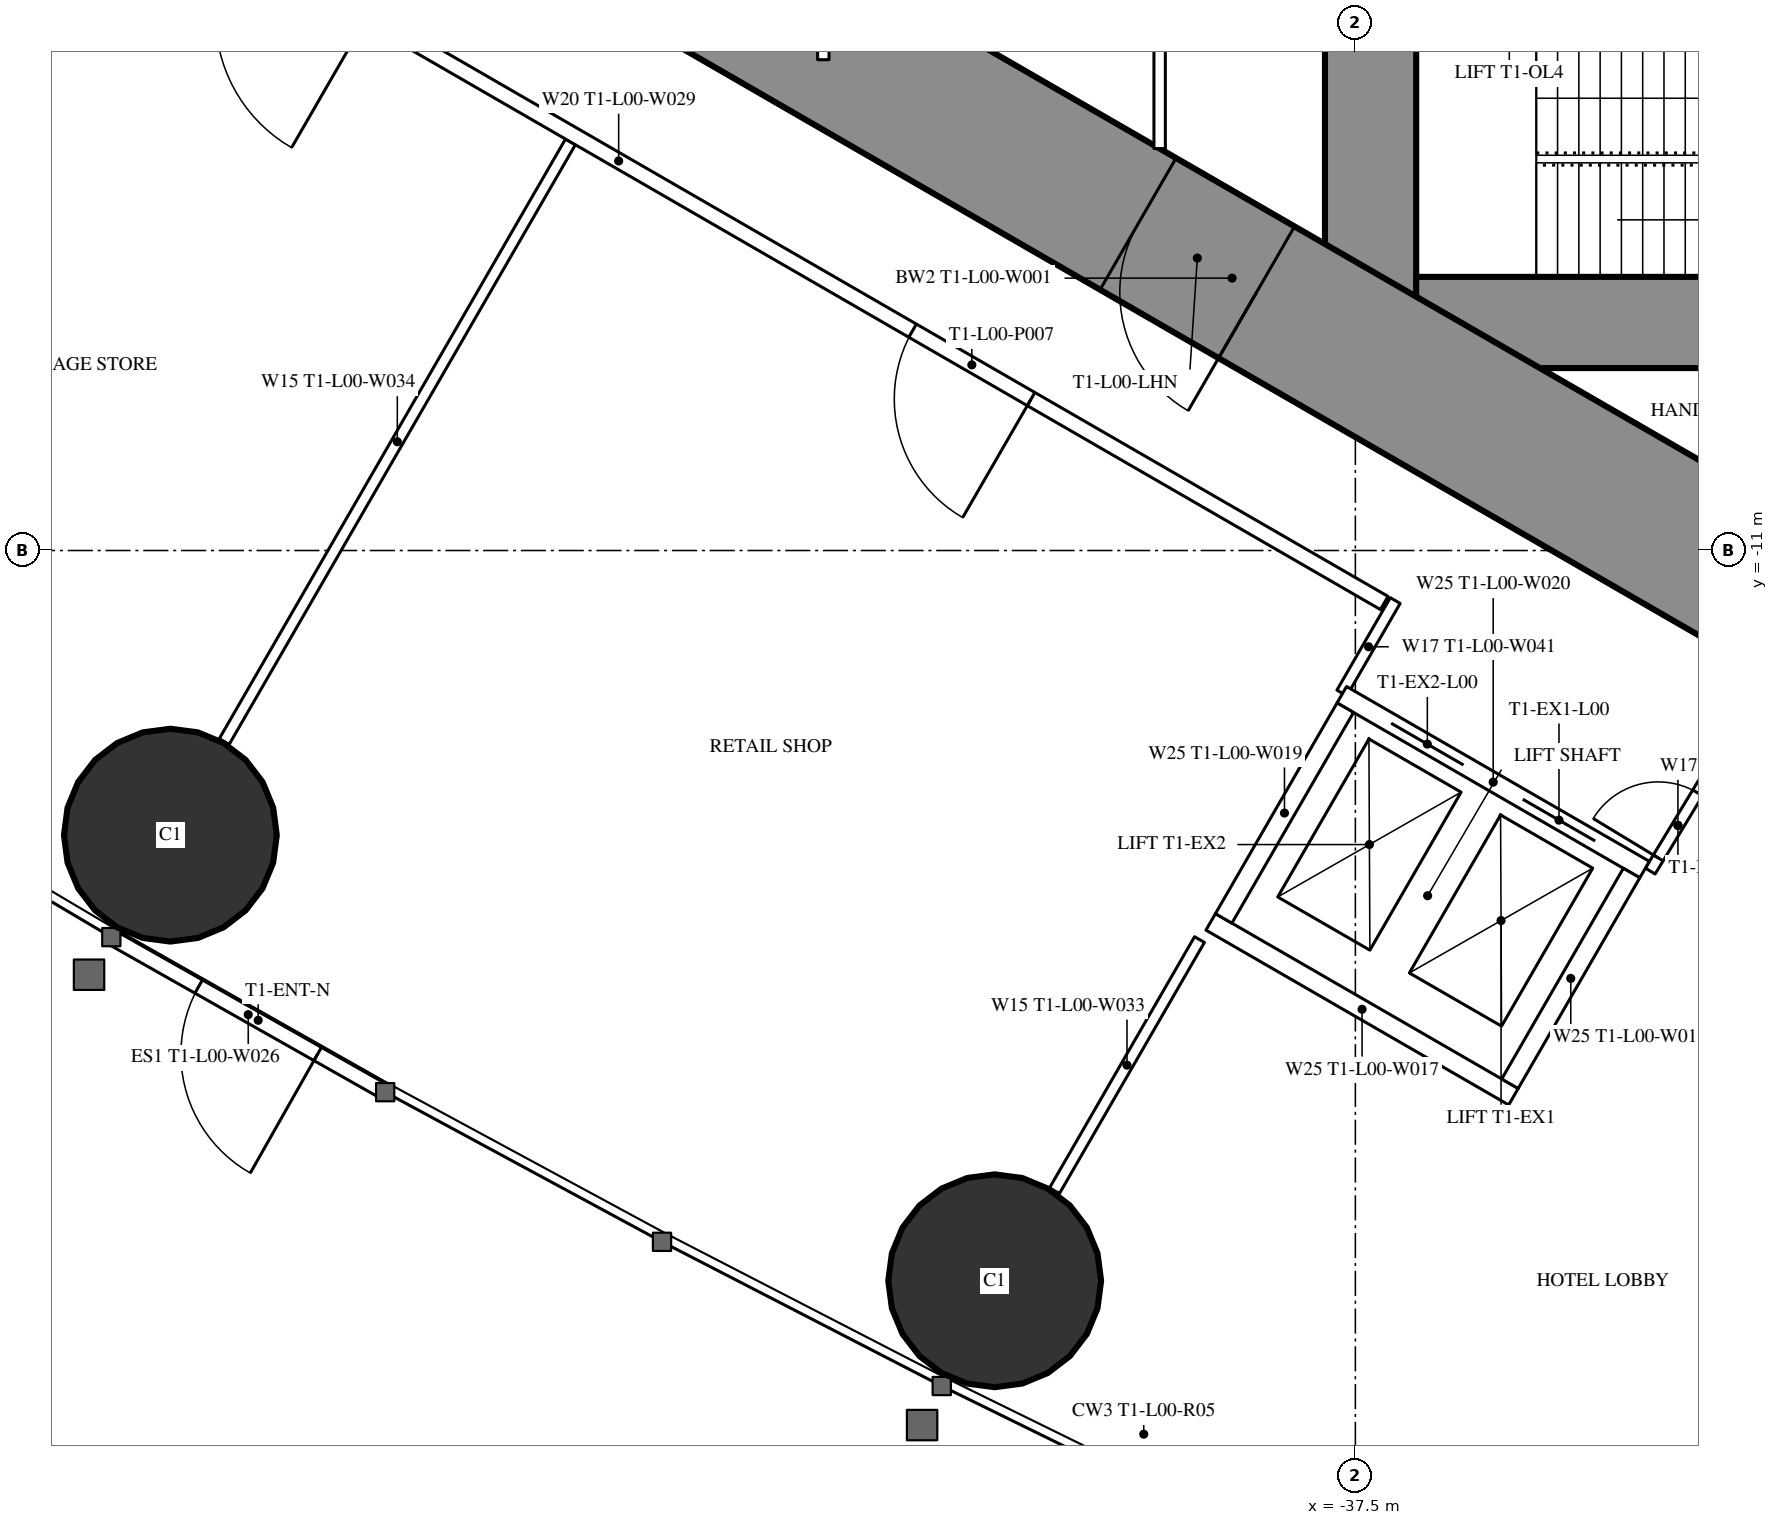
"""IFC4 building model, lengths in metres.
Left out: names, types, materials, properties, quantities, classifications, styles, units other than length and angle.
Written with IfcOpenShell. Run it as: python <this file> out.ifc"""

import sys

from ifc_helpers import new_model, si_unit, direction, frame, frame_2d, origin, origin_2d, place, context, subcontext, project, spatial, rectangle, hollow_circle, extrude, element, fill, save


model = new_model("IFC4")
c1 = context("Model", 3, precision=1e-05, world=origin(), true_north=direction((0.0, 1.0)))
c2 = subcontext(c1, "Body", "Model", "MODEL_VIEW")
j1 = project(units=[si_unit("LENGTHUNIT", "METRE"), si_unit("PLANEANGLEUNIT", "RADIAN")], contexts=[c1])
p1 = place(None, origin())
s1 = spatial("IfcSite", under=j1, at=p1, CompositionType="ELEMENT")
p2 = place(p1, origin())
s2 = spatial("IfcBuilding", under=s1, at=p2, CompositionType="ELEMENT")
p3 = place(p2, origin())
s3 = spatial("IfcBuildingStorey", under=s2, at=p3, CompositionType="ELEMENT", Elevation=0.0)
for number, where, z_axis, x_axis in (
    (1, (-53.09, -14.745, 0.0), (0.0, 0.0, 1.0), (1.0, 0.0, 0.0)),
    (2, (-42.245, -20.607, 0.0), (0.0, 0.0, 1.0), (1.0, 0.0, 0.0)),
):
    element("IfcColumn", number, at=place(p3, frame(where, z_axis=z_axis, x_axis=x_axis)), inside=s3, PredefinedType="COLUMN", context=c2, shape_type="SweptSolid", body=[
        extrude(hollow_circle(Radius=1.4, WallThickness=0.12, at=origin_2d()), origin(), (0.0, 0.0, 1.0), 7.2),
    ])
p4 = place(p3, frame((-37.3, 8.6, 0.0), z_axis=(0.0, 0.0, 1.0), x_axis=(0.0, -1.0, 0.0)))
e3 = element("IfcWall", 3, at=p4, inside=s3, PredefinedType="SHEAR", context=c2, shape_type="SweptSolid", body=[
    extrude(rectangle(XDim=17.2, YDim=1.2, at=frame_2d((8.6, 0.0))), origin(), (0.0, 0.0, 1.0), 7.2),
])
p5 = place(p4, frame((7.7, 0.0, 0.0)))
e4 = element("IfcOpeningElement", 4, at=p5, cuts=e3, PredefinedType="OPENING", context=c2, shape_type="SweptSolid", body=[
    extrude(rectangle(XDim=1.8, YDim=2.2, at=frame_2d((0.9, 1.1))), frame((0.0, 0.61, 0.0), z_axis=(0.0, -1.0, 0.0), x_axis=(1.0, 0.0, 0.0)), (0.0, 0.0, 1.0), 1.22),
])
p6 = place(p3, frame((-28.3, -8.0, 0.0), z_axis=(0.0, 0.0, 1.0), x_axis=(-1.0, 0.0, 0.0)))
e5 = element("IfcWall", 5, at=p6, inside=s3, PredefinedType="SHEAR", context=c2, shape_type="SweptSolid", body=[
    extrude(rectangle(XDim=8.4, YDim=1.2, at=frame_2d((4.2, 0.0))), origin(), (0.0, 0.0, 1.0), 7.2),
])
p7 = place(p6, frame((0.25, 0.0, 0.0)))
e6 = element("IfcOpeningElement", 6, at=p7, cuts=e5, PredefinedType="OPENING", context=c2, shape_type="SweptSolid", body=[
    extrude(rectangle(XDim=1.0, YDim=2.2, at=frame_2d((0.5, 1.1))), frame((0.0, 0.61, 0.0), z_axis=(0.0, -1.0, 0.0), x_axis=(1.0, 0.0, 0.0)), (0.0, 0.0, 1.0), 1.22),
])
p8 = place(p3, frame((-27.2, -14.3, 0.0), z_axis=(0.0, 0.0, 1.0), x_axis=(-0.866024044937, 0.500002353585, 0.0)))
e7 = element("IfcWall", 7, at=p8, inside=s3, PredefinedType="SHEAR", context=c2, shape_type="SweptSolid", body=[
    extrude(rectangle(XDim=27.533, YDim=2.0, at=frame_2d((13.767, 0.0))), origin(), (0.0, 0.0, 1.0), 7.2),
])
p9 = place(p8, frame((4.6, 0.0, 0.0)))
e8 = element("IfcOpeningElement", 8, at=p9, cuts=e7, PredefinedType="OPENING", context=c2, shape_type="SweptSolid", body=[
    extrude(rectangle(XDim=1.0, YDim=2.2, at=frame_2d((0.5, 1.1))), frame((0.0, 1.01, 0.0), z_axis=(0.0, -1.0, 0.0), x_axis=(1.0, 0.0, 0.0)), (0.0, 0.0, 1.0), 2.02),
])
p10 = place(p8, frame((13.395, 0.0, 0.0)))
e9 = element("IfcOpeningElement", 9, at=p10, cuts=e7, PredefinedType="OPENING", context=c2, shape_type="SweptSolid", body=[
    extrude(rectangle(XDim=1.8, YDim=2.2, at=frame_2d((0.9, 1.1))), frame((0.0, 1.01, 0.0), z_axis=(0.0, -1.0, 0.0), x_axis=(1.0, 0.0, 0.0)), (0.0, 0.0, 1.0), 2.02),
])
p11 = place(p3, frame((-50.264, -18.126, 0.0), z_axis=(0.0, 0.0, 1.0), x_axis=(-0.870206768985, 0.49268669478, 0.0)))
e10 = element("IfcWall", 10, at=p11, inside=s3, PredefinedType="STANDARD", context=c2, shape_type="SweptSolid", body=[
    extrude(rectangle(XDim=4.14, YDim=0.2, at=frame_2d((2.07, 0.0))), origin(), (0.0, 0.0, 1.0), 6.85),
])
p12 = place(p11, frame((1.02, 0.0, 0.0)))
e11 = element("IfcOpeningElement", 11, at=p12, cuts=e10, PredefinedType="OPENING", context=c2, shape_type="SweptSolid", body=[
    extrude(rectangle(XDim=1.8, YDim=2.4, at=frame_2d((0.9, 1.2))), frame((0.0, 0.11, 0.0), z_axis=(0.0, -1.0, 0.0), x_axis=(1.0, 0.0, 0.0)), (0.0, 0.0, 1.0), 0.22),
])
p13 = place(p3, frame((-47.827, -5.624, 0.0), z_axis=(0.0, 0.0, 1.0), x_axis=(-0.499995404498, -0.866028056982, 0.0)))
e12 = element("IfcWall", 12, at=p13, inside=s3, PredefinedType="PARTITIONING", context=c2, shape_type="SweptSolid", body=[
    extrude(rectangle(XDim=9.11, YDim=0.15, at=frame_2d((4.555, 0.0))), origin(), (0.0, 0.0, 1.0), 5.85),
])
p14 = place(p3, frame((-39.551, -16.118, 0.0), z_axis=(0.0, 0.0, 1.0), x_axis=(-0.499986503906, -0.866033195618, 0.0)))
e13 = element("IfcWall", 13, at=p14, inside=s3, PredefinedType="PARTITIONING", context=c2, shape_type="SweptSolid", body=[
    extrude(rectangle(XDim=3.815, YDim=0.15, at=frame_2d((1.907, 0.0))), origin(), (0.0, 0.0, 1.0), 6.85),
])
p15 = place(p3, frame((-27.5, -17.244, 0.0), z_axis=(0.0, 0.0, 1.0), x_axis=(-0.866027347857, 0.499996632752, 0.0)))
e14 = element("IfcWall", 14, at=p15, inside=s3, PredefinedType="PARTITIONING", context=c2, shape_type="SweptSolid", body=[
    extrude(rectangle(XDim=6.269, YDim=0.2, at=frame_2d((3.135, 0.0))), origin(), (0.0, 0.0, 1.0), 6.85),
])
p16 = place(p3, frame((-37.12, -11.69, 0.0), z_axis=(0.0, 0.0, 1.0), x_axis=(-0.866028803602, 0.499994111297, 0.0)))
e15 = element("IfcWall", 15, at=p16, inside=s3, PredefinedType="PARTITIONING", context=c2, shape_type="SweptSolid", body=[
    extrude(rectangle(XDim=23.26, YDim=0.2, at=frame_2d((11.63, 0.0))), origin(), (0.0, 0.0, 1.0), 6.85),
])
p17 = place(p16, frame((20.909, 0.0, 0.0)))
e16 = element("IfcOpeningElement", 16, at=p17, cuts=e15, PredefinedType="OPENING", context=c2, shape_type="SweptSolid", body=[
    extrude(rectangle(XDim=1.8, YDim=2.2, at=frame_2d((0.9, 1.1))), frame((0.0, 0.11, 0.0), z_axis=(0.0, -1.0, 0.0), x_axis=(1.0, 0.0, 0.0)), (0.0, 0.0, 1.0), 0.22),
])
p18 = place(p16, frame((15.444, 0.0, 0.0)))
e17 = element("IfcOpeningElement", 17, at=p18, cuts=e15, PredefinedType="OPENING", context=c2, shape_type="SweptSolid", body=[
    extrude(rectangle(XDim=2.0, YDim=2.4, at=frame_2d((1.0, 1.2))), frame((0.0, 0.11, 0.0), z_axis=(0.0, -1.0, 0.0), x_axis=(1.0, 0.0, 0.0)), (0.0, 0.0, 1.0), 0.22),
])
p19 = place(p16, frame((5.365, 0.0, 0.0)))
e18 = element("IfcOpeningElement", 18, at=p19, cuts=e15, PredefinedType="OPENING", context=c2, shape_type="SweptSolid", body=[
    extrude(rectangle(XDim=1.8, YDim=2.2, at=frame_2d((0.9, 1.1))), frame((0.0, 0.11, 0.0), z_axis=(0.0, -1.0, 0.0), x_axis=(1.0, 0.0, 0.0)), (0.0, 0.0, 1.0), 0.22),
])
p20 = place(p3, frame((-36.976, -11.658, 0.0), z_axis=(0.0, 0.0, 1.0), x_axis=(-0.50008355685, -0.86597715684, 0.0)))
e19 = element("IfcWall", 19, at=p20, inside=s3, PredefinedType="PARTITIONING", context=c2, shape_type="SweptSolid", body=[
    extrude(rectangle(XDim=1.405, YDim=0.15, at=frame_2d((0.702, 0.0))), origin(), (0.0, 0.0, 1.0), 6.85),
])
p21 = place(p3, frame((-33.621, -15.218, 0.0), z_axis=(0.0, 0.0, 1.0), x_axis=(0.518424923641, 0.855123148177, 0.0)))
e20 = element("IfcWall", 20, at=p21, inside=s3, PredefinedType="PARTITIONING", context=c2, shape_type="SweptSolid", body=[
    extrude(rectangle(XDim=1.405, YDim=0.15, at=frame_2d((0.703, 0.0))), origin(), (0.0, 0.0, 1.0), 6.85),
])
p22 = place(p21, frame((0.203, 0.0, 0.0)))
e21 = element("IfcOpeningElement", 21, at=p22, cuts=e20, PredefinedType="OPENING", context=c2, shape_type="SweptSolid", body=[
    extrude(rectangle(XDim=1.0, YDim=2.2, at=frame_2d((0.5, 1.1))), frame((0.0, 0.085, 0.0), z_axis=(0.0, -1.0, 0.0), x_axis=(1.0, 0.0, 0.0)), (0.0, 0.0, 1.0), 0.17),
])
p23 = place(p3, frame((-40.075, 5.712, 0.0), z_axis=(0.0, 0.0, 1.0), x_axis=(0.0, -1.0, 0.0)))
e22 = element("IfcWall", 22, at=p23, inside=s3, PredefinedType="PARTITIONING", context=c2, shape_type="SweptSolid", body=[
    extrude(rectangle(XDim=11.424, YDim=0.15, at=frame_2d((5.712, 0.0))), origin(), (0.0, 0.0, 1.0), 6.85),
])
p24 = place(p23, frame((4.812, 0.0, 0.0)))
e23 = element("IfcOpeningElement", 23, at=p24, cuts=e22, PredefinedType="OPENING", context=c2, shape_type="SweptSolid", body=[
    extrude(rectangle(XDim=1.8, YDim=2.2, at=frame_2d((0.9, 1.1))), frame((0.0, 0.085, 0.0), z_axis=(0.0, -1.0, 0.0), x_axis=(1.0, 0.0, 0.0)), (0.0, 0.0, 1.0), 0.17),
])
p25 = place(p3, frame((-44.5, 4.543, 0.0), z_axis=(0.0, 0.0, 1.0), x_axis=(0.0, -1.0, 0.0)))
e24 = element("IfcWall", 24, at=p25, inside=s3, PredefinedType="PARTITIONING", context=c2, shape_type="SweptSolid", body=[
    extrude(rectangle(XDim=9.085, YDim=0.15, at=frame_2d((4.543, 0.0))), origin(), (0.0, 0.0, 1.0), 6.85),
])
p26 = place(p25, frame((4.043, 0.0, 0.0)))
e25 = element("IfcOpeningElement", 25, at=p26, cuts=e24, PredefinedType="OPENING", context=c2, shape_type="SweptSolid", body=[
    extrude(rectangle(XDim=1.0, YDim=2.2, at=frame_2d((0.5, 1.1))), frame((0.0, 0.085, 0.0), z_axis=(0.0, -1.0, 0.0), x_axis=(1.0, 0.0, 0.0)), (0.0, 0.0, 1.0), 0.17),
])
p27 = place(p3, frame((-33.696, -15.197, 0.0), z_axis=(0.0, 0.0, 1.0), x_axis=(-0.865976953817, 0.500083908417, 0.0)))
e26 = element("IfcWall", 26, at=p27, inside=s3, PredefinedType="PARTITIONING", context=c2, shape_type="SweptSolid", body=[
    extrude(rectangle(XDim=4.599, YDim=0.25, at=frame_2d((2.3, 0.0))), origin(), (0.0, 0.0, 1.0), 6.85),
])
p28 = place(p27, frame((0.75, 0.0, 0.0)))
e27 = element("IfcOpeningElement", 27, at=p28, cuts=e26, PredefinedType="OPENING", context=c2, shape_type="SweptSolid", body=[
    extrude(rectangle(XDim=1.1, YDim=2.2, at=frame_2d((0.55, 1.1))), frame((0.0, 0.135, 0.0), z_axis=(0.0, -1.0, 0.0), x_axis=(1.0, 0.0, 0.0)), (0.0, 0.0, 1.0), 0.27),
])
p29 = place(p27, frame((2.75, 0.0, 0.0)))
e28 = element("IfcOpeningElement", 28, at=p29, cuts=e26, PredefinedType="OPENING", context=c2, shape_type="SweptSolid", body=[
    extrude(rectangle(XDim=1.1, YDim=2.2, at=frame_2d((0.55, 1.1))), frame((0.0, 0.135, 0.0), z_axis=(0.0, -1.0, 0.0), x_axis=(1.0, 0.0, 0.0)), (0.0, 0.0, 1.0), 0.27),
])
p30 = place(p3, frame((-35.42, -18.186, 0.0), z_axis=(0.0, 0.0, 1.0), x_axis=(-0.865990227814, 0.50006092162, 0.0)))
e29 = element("IfcWall", 29, at=p30, inside=s3, PredefinedType="PARTITIONING", context=c2, shape_type="SweptSolid", body=[
    extrude(rectangle(XDim=4.6, YDim=0.25, at=frame_2d((2.3, 0.0))), origin(), (0.0, 0.0, 1.0), 6.85),
])
p31 = place(p3, frame((-33.866, -15.243, 0.0), z_axis=(0.0, 0.0, 1.0), x_axis=(-0.499929347863, -0.866066190972, 0.0)))
e30 = element("IfcWall", 30, at=p31, inside=s3, PredefinedType="PARTITIONING", context=c2, shape_type="SweptSolid", body=[
    extrude(rectangle(XDim=3.201, YDim=0.25, at=frame_2d((1.6, 0.0))), origin(), (0.0, 0.0, 1.0), 6.85),
])
p32 = place(p3, frame((-37.633, -13.068, 0.0), z_axis=(0.0, 0.0, 1.0), x_axis=(-0.499872130319, -0.866099216793, 0.0)))
e31 = element("IfcWall", 31, at=p32, inside=s3, PredefinedType="PARTITIONING", context=c2, shape_type="SweptSolid", body=[
    extrude(rectangle(XDim=3.2, YDim=0.25, at=frame_2d((1.6, 0.0))), origin(), (0.0, 0.0, 1.0), 6.85),
])
p33 = place(p12, origin())
e32 = element("IfcDoor", 32, at=p33, inside=s3, OperationType="SINGLE_SWING_LEFT", PredefinedType="DOOR", context=c2, shape_type="SweptSolid", body=[
    extrude(rectangle(XDim=1.8, YDim=2.4, at=frame_2d((0.9, 1.2))), frame((0.0, 0.025, 0.0), z_axis=(0.0, -1.0, 0.0), x_axis=(1.0, 0.0, 0.0)), (0.0, 0.0, 1.0), 0.05),
])
fill(e11, e32)
p34 = place(p19, origin())
e33 = element("IfcDoor", 33, at=p34, inside=s3, OperationType="DOUBLE_DOOR_SINGLE_SWING", PredefinedType="DOOR", context=c2, shape_type="SweptSolid", body=[
    extrude(rectangle(XDim=1.8, YDim=2.2, at=frame_2d((0.9, 1.1))), frame((0.0, 0.025, 0.0), z_axis=(0.0, -1.0, 0.0), x_axis=(1.0, 0.0, 0.0)), (0.0, 0.0, 1.0), 0.05),
])
fill(e18, e33)
p35 = place(p22, origin())
e34 = element("IfcDoor", 34, at=p35, inside=s3, OperationType="SINGLE_SWING_LEFT", PredefinedType="DOOR", context=c2, shape_type="SweptSolid", body=[
    extrude(rectangle(XDim=1.0, YDim=2.2, at=frame_2d((0.5, 1.1))), frame((0.0, 0.025, 0.0), z_axis=(0.0, -1.0, 0.0), x_axis=(1.0, 0.0, 0.0)), (0.0, 0.0, 1.0), 0.05),
])
fill(e21, e34)
p36 = place(p10, origin())
e35 = element("IfcDoor", 35, at=p36, inside=s3, OperationType="DOUBLE_DOOR_SINGLE_SWING", PredefinedType="DOOR", context=c2, shape_type="SweptSolid", body=[
    extrude(rectangle(XDim=1.8, YDim=2.2, at=frame_2d((0.9, 1.1))), frame((0.0, 0.025, 0.0), z_axis=(0.0, -1.0, 0.0), x_axis=(1.0, 0.0, 0.0)), (0.0, 0.0, 1.0), 0.05),
])
fill(e9, e35)
p37 = place(p28, origin())
e36 = element("IfcDoor", 36, at=p37, inside=s3, OperationType="DOUBLE_DOOR_SLIDING", PredefinedType="USERDEFINED", context=c2, shape_type="SweptSolid", body=[
    extrude(rectangle(XDim=1.1, YDim=2.2, at=frame_2d((0.55, 1.1))), frame((0.0, 0.025, 0.0), z_axis=(0.0, -1.0, 0.0), x_axis=(1.0, 0.0, 0.0)), (0.0, 0.0, 1.0), 0.05),
])
fill(e27, e36)
p38 = place(p29, origin())
e37 = element("IfcDoor", 37, at=p38, inside=s3, OperationType="DOUBLE_DOOR_SLIDING", PredefinedType="USERDEFINED", context=c2, shape_type="SweptSolid", body=[
    extrude(rectangle(XDim=1.1, YDim=2.2, at=frame_2d((0.55, 1.1))), frame((0.0, 0.025, 0.0), z_axis=(0.0, -1.0, 0.0), x_axis=(1.0, 0.0, 0.0)), (0.0, 0.0, 1.0), 0.05),
])
fill(e28, e37)
save(model, sys.argv[1])
